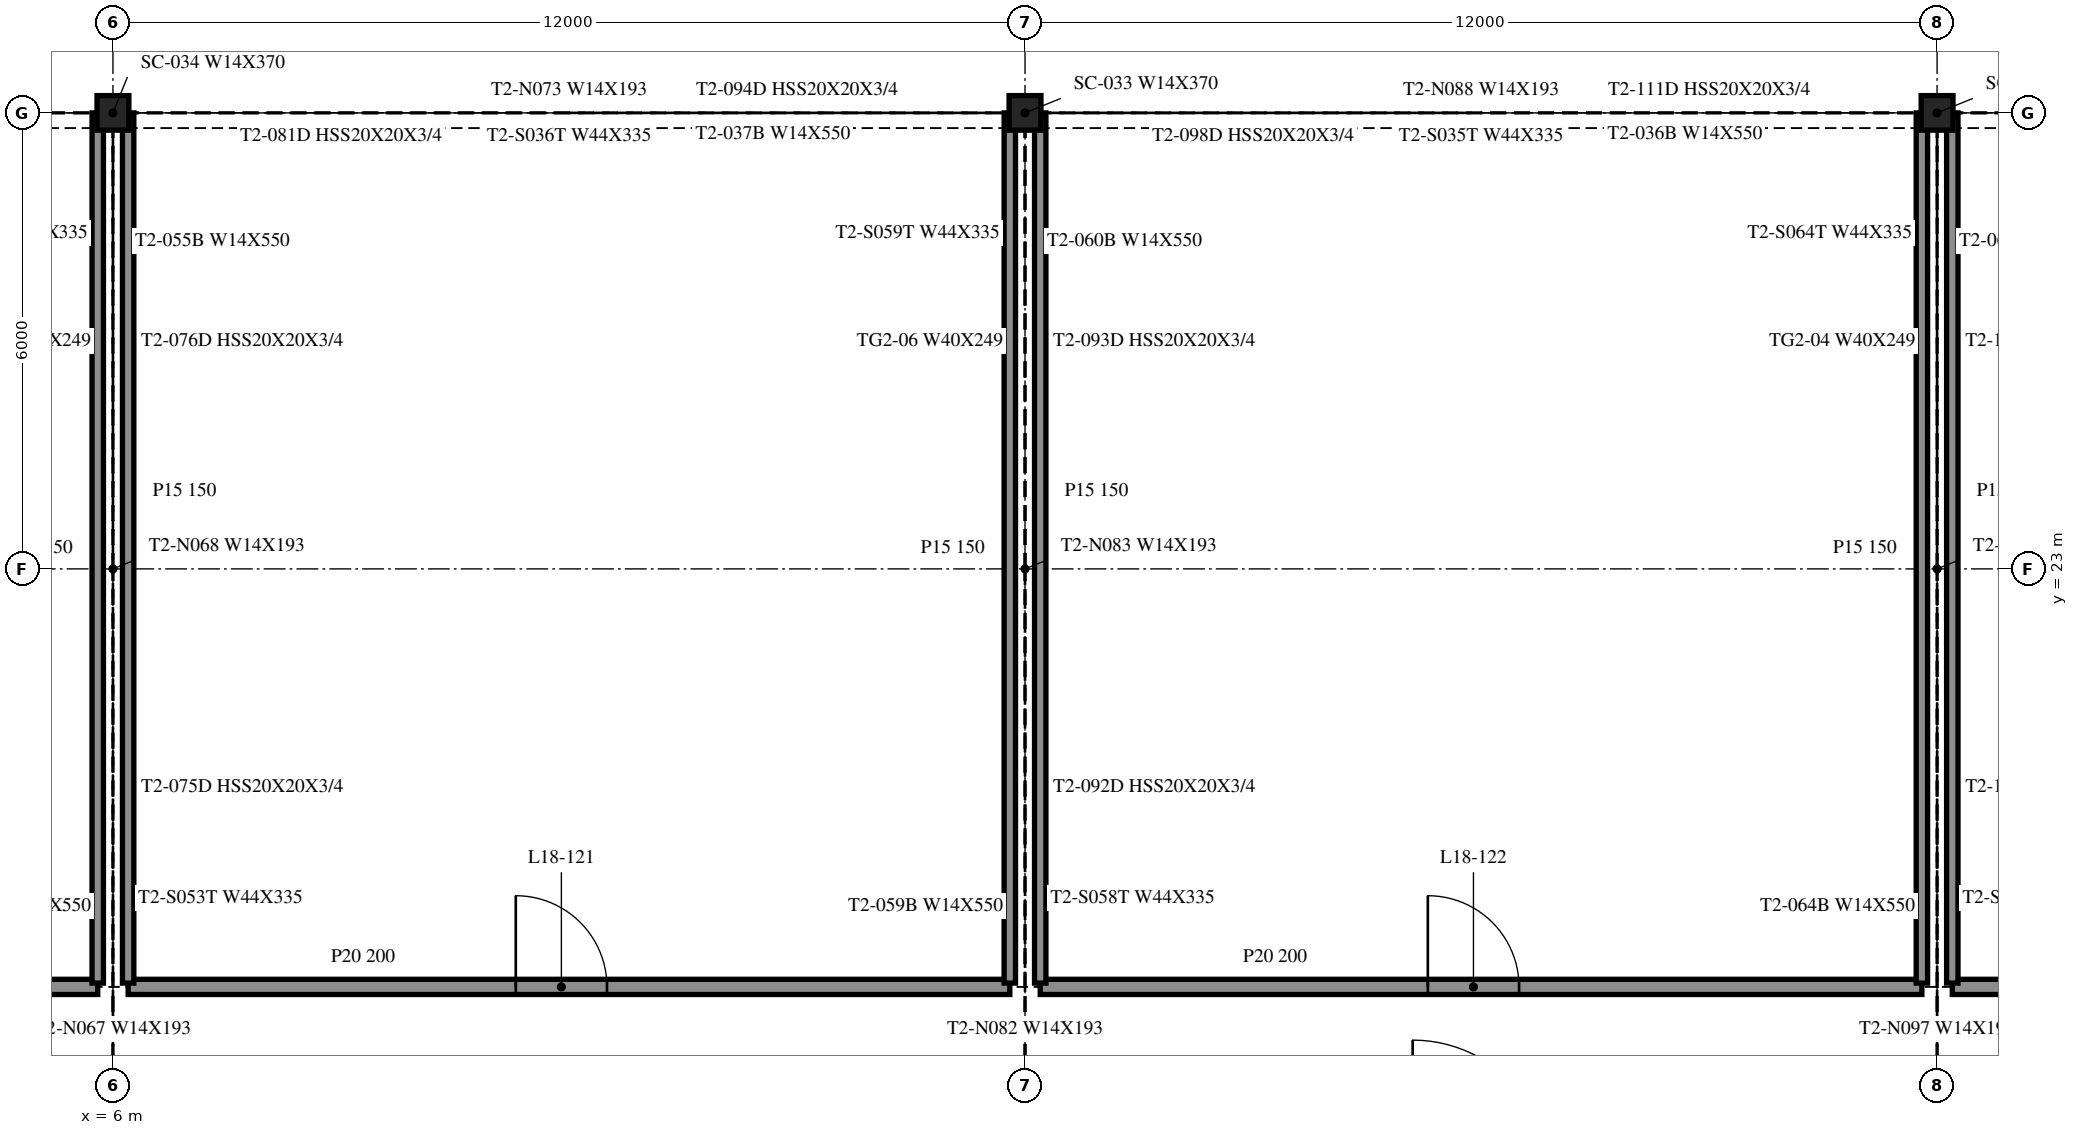
"""IFC4 building model, lengths in metres.
Left out: names, types, materials, properties, quantities, classifications, styles, units other than length and angle.
Written with IfcOpenShell. Run it as: python <this file> out.ifc"""

import sys

from ifc_helpers import new_model, si_unit, direction, frame, frame_2d, origin, origin_2d, place, context, subcontext, project, spatial, rectangle, i_section, extrude, element, fill, save


model = new_model("IFC4")
c1 = context("Model", 3, precision=1e-05, world=origin(), true_north=direction((0.0, 1.0)))
c2 = subcontext(c1, "Body", "Model", "MODEL_VIEW")
j1 = project(units=[si_unit("LENGTHUNIT", "METRE"), si_unit("PLANEANGLEUNIT", "RADIAN")], contexts=[c1])
p1 = place(None, origin())
s1 = spatial("IfcSite", under=j1, at=p1, CompositionType="ELEMENT")
p2 = place(p1, origin())
s2 = spatial("IfcBuilding", under=s1, at=p2, CompositionType="ELEMENT")
p3 = place(p2, frame((0.0, 0.0, 80.4)))
s3 = spatial("IfcBuildingStorey", under=s2, at=p3, CompositionType="ELEMENT", Elevation=80.4)
for number, where, z_axis, x_axis in (
    (1, (30.0, 29.0, -0.55), (0.0, 0.0, 1.0), (1.0, 0.0, 0.0)),
    (2, (18.0, 29.0, -0.55), (0.0, 0.0, 1.0), (1.0, 0.0, 0.0)),
    (3, (6.0, 29.0, -0.55), (0.0, 0.0, 1.0), (1.0, 0.0, 0.0)),
):
    element("IfcColumn", number, at=place(p3, frame(where, z_axis=z_axis, x_axis=x_axis)), inside=s3, PredefinedType="COLUMN", context=c2, shape_type="SweptSolid", body=[
        extrude(i_section(OverallWidth=0.419, OverallDepth=0.455, WebThickness=0.042, FlangeThickness=0.068, at=origin_2d()), origin(), (0.0, 0.0, 1.0), 4.61),
    ])
p4 = place(p3, frame((-5.8, 17.5, 0.0), z_axis=(0.0, 0.0, 1.0), x_axis=(1.0, 0.0, 0.0)))
e4 = element("IfcWall", 4, at=p4, inside=s3, PredefinedType="PARTITIONING", context=c2, shape_type="SweptSolid", body=[
    extrude(rectangle(XDim=11.6, YDim=0.2, at=frame_2d((5.8, 0.0))), origin(), (0.0, 0.0, 1.0), 4.06),
])
p5 = place(p4, frame((5.3, 0.0, 0.0)))
e5 = element("IfcOpeningElement", 5, at=p5, cuts=e4, PredefinedType="OPENING", context=c2, shape_type="SweptSolid", body=[
    extrude(rectangle(XDim=1.0, YDim=2.1, at=frame_2d((0.5, 1.05))), frame((0.0, 0.11, 0.0), z_axis=(0.0, -1.0, 0.0), x_axis=(1.0, 0.0, 0.0)), (0.0, 0.0, 1.0), 0.22),
])
p6 = place(p3, frame((6.2, 17.5, 0.0), z_axis=(0.0, 0.0, 1.0), x_axis=(1.0, 0.0, 0.0)))
e6 = element("IfcWall", 6, at=p6, inside=s3, PredefinedType="PARTITIONING", context=c2, shape_type="SweptSolid", body=[
    extrude(rectangle(XDim=11.6, YDim=0.2, at=frame_2d((5.8, 0.0))), origin(), (0.0, 0.0, 1.0), 4.06),
])
p7 = place(p6, frame((5.1, 0.0, 0.0)))
e7 = element("IfcOpeningElement", 7, at=p7, cuts=e6, PredefinedType="OPENING", context=c2, shape_type="SweptSolid", body=[
    extrude(rectangle(XDim=1.2, YDim=2.1, at=frame_2d((0.6, 1.05))), frame((0.0, 0.11, 0.0), z_axis=(0.0, -1.0, 0.0), x_axis=(1.0, 0.0, 0.0)), (0.0, 0.0, 1.0), 0.22),
])
p8 = place(p3, frame((18.2, 17.5, 0.0), z_axis=(0.0, 0.0, 1.0), x_axis=(1.0, 0.0, 0.0)))
e8 = element("IfcWall", 8, at=p8, inside=s3, PredefinedType="PARTITIONING", context=c2, shape_type="SweptSolid", body=[
    extrude(rectangle(XDim=11.6, YDim=0.2, at=frame_2d((5.8, 0.0))), origin(), (0.0, 0.0, 1.0), 4.06),
])
p9 = place(p8, frame((5.1, 0.0, 0.0)))
e9 = element("IfcOpeningElement", 9, at=p9, cuts=e8, PredefinedType="OPENING", context=c2, shape_type="SweptSolid", body=[
    extrude(rectangle(XDim=1.2, YDim=2.1, at=frame_2d((0.6, 1.05))), frame((0.0, 0.11, 0.0), z_axis=(0.0, -1.0, 0.0), x_axis=(1.0, 0.0, 0.0)), (0.0, 0.0, 1.0), 0.22),
])
p10 = place(p3, frame((30.2, 17.5, 0.0), z_axis=(0.0, 0.0, 1.0), x_axis=(1.0, 0.0, 0.0)))
e10 = element("IfcWall", 10, at=p10, inside=s3, PredefinedType="PARTITIONING", context=c2, shape_type="SweptSolid", body=[
    extrude(rectangle(XDim=11.6, YDim=0.2, at=frame_2d((5.8, 0.0))), origin(), (0.0, 0.0, 1.0), 4.06),
])
p11 = place(p10, frame((5.3, 0.0, 0.0)))
e11 = element("IfcOpeningElement", 11, at=p11, cuts=e10, PredefinedType="OPENING", context=c2, shape_type="SweptSolid", body=[
    extrude(rectangle(XDim=1.0, YDim=2.1, at=frame_2d((0.5, 1.05))), frame((0.0, 0.11, 0.0), z_axis=(0.0, -1.0, 0.0), x_axis=(1.0, 0.0, 0.0)), (0.0, 0.0, 1.0), 0.22),
])
for number, where, z_axis, x_axis in (
    (12, (5.8, 17.55, 0.0), (0.0, 0.0, 1.0), (0.0, 1.0, 0.0)),
    (13, (6.2, 17.55, 0.0), (0.0, 0.0, 1.0), (0.0, 1.0, 0.0)),
    (14, (17.8, 17.55, 0.0), (0.0, 0.0, 1.0), (0.0, 1.0, 0.0)),
    (15, (18.2, 17.55, 0.0), (0.0, 0.0, 1.0), (0.0, 1.0, 0.0)),
    (16, (29.8, 17.55, 0.0), (0.0, 0.0, 1.0), (0.0, 1.0, 0.0)),
    (17, (30.2, 17.55, 0.0), (0.0, 0.0, 1.0), (0.0, 1.0, 0.0)),
):
    element("IfcWall", number, at=place(p3, frame(where, z_axis=z_axis, x_axis=x_axis)), inside=s3, PredefinedType="PARTITIONING", context=c2, shape_type="SweptSolid", body=[
        extrude(rectangle(XDim=11.45, YDim=0.15, at=frame_2d((5.725, 0.0))), origin(), (0.0, 0.0, 1.0), 4.06),
    ])
p12 = place(p7, origin())
e18 = element("IfcDoor", 18, at=p12, inside=s3, OperationType="SINGLE_SWING_LEFT", PredefinedType="DOOR", context=c2, shape_type="SweptSolid", body=[
    extrude(rectangle(XDim=1.2, YDim=2.1, at=frame_2d((0.6, 1.05))), frame((0.0, 0.025, 0.0), z_axis=(0.0, -1.0, 0.0), x_axis=(1.0, 0.0, 0.0)), (0.0, 0.0, 1.0), 0.05),
])
fill(e7, e18)
p13 = place(p9, origin())
e19 = element("IfcDoor", 19, at=p13, inside=s3, OperationType="SINGLE_SWING_LEFT", PredefinedType="DOOR", context=c2, shape_type="SweptSolid", body=[
    extrude(rectangle(XDim=1.2, YDim=2.1, at=frame_2d((0.6, 1.05))), frame((0.0, 0.025, 0.0), z_axis=(0.0, -1.0, 0.0), x_axis=(1.0, 0.0, 0.0)), (0.0, 0.0, 1.0), 0.05),
])
fill(e9, e19)
save(model, sys.argv[1])
